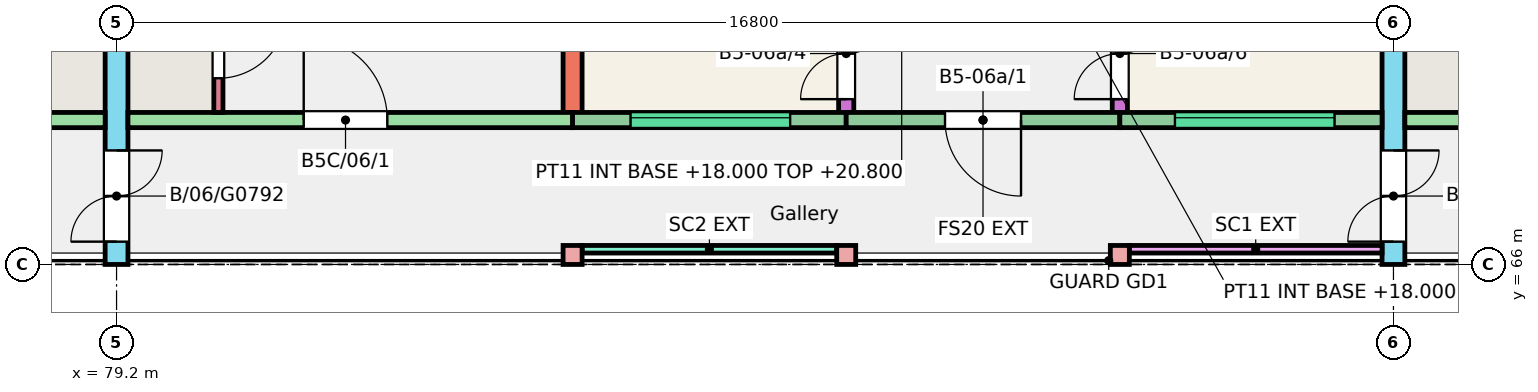
"""IFC4 building model, lengths in metres.
Left out: names, types, materials, properties, quantities, classifications, styles, units other than length and angle.
Written with IfcOpenShell. Run it as: python <this file> out.ifc"""

import sys

from ifc_helpers import new_model, si_unit, direction, frame, frame_2d, origin, origin_2d, place, context, subcontext, project, spatial, rectangle, extrude, element, fill, save


model = new_model("IFC4")
c1 = context("Model", 3, precision=1e-05, world=origin(), true_north=direction((0.0, 1.0)))
c2 = subcontext(c1, "Body", "Model", "MODEL_VIEW")
j1 = project(units=[si_unit("LENGTHUNIT", "METRE"), si_unit("PLANEANGLEUNIT", "RADIAN")], contexts=[c1])
p1 = place(None, origin())
s1 = spatial("IfcSite", under=j1, at=p1, CompositionType="ELEMENT")
p2 = place(p1, origin())
s2 = spatial("IfcBuilding", under=s1, at=p2, CompositionType="ELEMENT")
p3 = place(p2, frame((0.0, 0.0, 18.0)))
s3 = spatial("IfcBuildingStorey", under=s2, at=p3, CompositionType="ELEMENT", Elevation=18.0)
p4 = place(p3, frame((79.2, 66.0, 0.0), z_axis=(0.0, 0.0, 1.0), x_axis=(0.0, 1.0, 0.0)))
e1 = element("IfcWall", 1, at=p4, inside=s3, PredefinedType="SHEAR", context=c2, shape_type="SweptSolid", body=[
    extrude(rectangle(XDim=11.0, YDim=0.3, at=frame_2d((5.5, 0.0))), origin(), (0.0, 0.0, 1.0), 3.0),
])
p5 = place(p4, frame((0.3, 0.0, 0.0)))
e2 = element("IfcOpeningElement", 2, at=p5, cuts=e1, PredefinedType="OPENING", context=c2, shape_type="SweptSolid", body=[
    extrude(rectangle(XDim=1.2, YDim=2.1, at=frame_2d((0.6, 1.05))), frame((0.0, 0.16, 0.0), z_axis=(0.0, -1.0, 0.0), x_axis=(1.0, 0.0, 0.0)), (0.0, 0.0, 1.0), 0.32),
])
p6 = place(p3, frame((85.2, 68.0, 0.0), z_axis=(0.0, 0.0, 1.0), x_axis=(0.0, 1.0, 0.0)))
e3 = element("IfcWall", 3, at=p6, inside=s3, PredefinedType="SHEAR", context=c2, shape_type="SweptSolid", body=[
    extrude(rectangle(XDim=9.0, YDim=0.25, at=frame_2d((4.5, 0.0))), origin(), (0.0, 0.0, 1.0), 3.0),
])
p7 = place(p3, frame((88.8, 68.0, 0.0), z_axis=(0.0, 0.0, 1.0), x_axis=(0.0, 1.0, 0.0)))
e4 = element("IfcWall", 4, at=p7, inside=s3, PredefinedType="SHEAR", context=c2, shape_type="SweptSolid", body=[
    extrude(rectangle(XDim=9.0, YDim=0.2, at=frame_2d((4.5, 0.0))), origin(), (0.0, 0.0, 1.0), 3.0),
])
p8 = place(p7, frame((0.175, 0.0, 0.0)))
e5 = element("IfcOpeningElement", 5, at=p8, cuts=e4, PredefinedType="OPENING", context=c2, shape_type="SweptSolid", body=[
    extrude(rectangle(XDim=1.2, YDim=2.1, at=frame_2d((0.6, 1.05))), frame((0.0, 0.11, 0.0), z_axis=(0.0, -1.0, 0.0), x_axis=(1.0, 0.0, 0.0)), (0.0, 0.0, 1.0), 0.22),
])
p9 = place(p7, frame((6.4, 0.0, 0.0)))
e6 = element("IfcOpeningElement", 6, at=p9, cuts=e4, PredefinedType="OPENING", context=c2, shape_type="SweptSolid", body=[
    extrude(rectangle(XDim=1.2, YDim=2.1, at=frame_2d((0.6, 1.05))), frame((0.0, 0.11, 0.0), z_axis=(0.0, -1.0, 0.0), x_axis=(1.0, 0.0, 0.0)), (0.0, 0.0, 1.0), 0.22),
])
p10 = place(p3, frame((92.4, 68.0, 0.0), z_axis=(0.0, 0.0, 1.0), x_axis=(0.0, 1.0, 0.0)))
e7 = element("IfcWall", 7, at=p10, inside=s3, PredefinedType="SHEAR", context=c2, shape_type="SweptSolid", body=[
    extrude(rectangle(XDim=9.0, YDim=0.2, at=frame_2d((4.5, 0.0))), origin(), (0.0, 0.0, 1.0), 3.0),
])
p11 = place(p10, frame((0.175, 0.0, 0.0)))
e8 = element("IfcOpeningElement", 8, at=p11, cuts=e7, PredefinedType="OPENING", context=c2, shape_type="SweptSolid", body=[
    extrude(rectangle(XDim=1.2, YDim=2.1, at=frame_2d((0.6, 1.05))), frame((0.0, 0.11, 0.0), z_axis=(0.0, -1.0, 0.0), x_axis=(1.0, 0.0, 0.0)), (0.0, 0.0, 1.0), 0.22),
])
p12 = place(p10, frame((6.4, 0.0, 0.0)))
e9 = element("IfcOpeningElement", 9, at=p12, cuts=e7, PredefinedType="OPENING", context=c2, shape_type="SweptSolid", body=[
    extrude(rectangle(XDim=1.2, YDim=2.1, at=frame_2d((0.6, 1.05))), frame((0.0, 0.11, 0.0), z_axis=(0.0, -1.0, 0.0), x_axis=(1.0, 0.0, 0.0)), (0.0, 0.0, 1.0), 0.22),
])
p13 = place(p3, frame((96.0, 66.0, 0.0), z_axis=(0.0, 0.0, 1.0), x_axis=(0.0, 1.0, 0.0)))
e10 = element("IfcWall", 10, at=p13, inside=s3, PredefinedType="SHEAR", context=c2, shape_type="SweptSolid", body=[
    extrude(rectangle(XDim=11.0, YDim=0.3, at=frame_2d((5.5, 0.0))), origin(), (0.0, 0.0, 1.0), 3.0),
])
p14 = place(p13, frame((0.3, 0.0, 0.0)))
e11 = element("IfcOpeningElement", 11, at=p14, cuts=e10, PredefinedType="OPENING", context=c2, shape_type="SweptSolid", body=[
    extrude(rectangle(XDim=1.2, YDim=2.1, at=frame_2d((0.6, 1.05))), frame((0.0, 0.16, 0.0), z_axis=(0.0, -1.0, 0.0), x_axis=(1.0, 0.0, 0.0)), (0.0, 0.0, 1.0), 0.32),
])
p15 = place(p3, frame((73.2, 67.9, 0.0), z_axis=(0.0, 0.0, 1.0), x_axis=(1.0, 0.0, 0.0)))
e12 = element("IfcWall", 12, at=p15, inside=s3, PredefinedType="SHEAR", context=c2, shape_type="SweptSolid", body=[
    extrude(rectangle(XDim=5.85, YDim=0.2, at=frame_2d((2.925, 0.0))), origin(), (0.0, 0.0, 1.0), 3.0),
])
p16 = place(p15, frame((2.438, 0.0, 0.0)))
e13 = element("IfcOpeningElement", 13, at=p16, cuts=e12, PredefinedType="OPENING", context=c2, shape_type="SweptSolid", body=[
    extrude(rectangle(XDim=1.1, YDim=2.1, at=frame_2d((0.55, 1.05))), frame((0.0, 0.11, 0.0), z_axis=(0.0, -1.0, 0.0), x_axis=(1.0, 0.0, 0.0)), (0.0, 0.0, 1.0), 0.22),
])
p17 = place(p3, frame((79.35, 67.9, 0.0), z_axis=(0.0, 0.0, 1.0), x_axis=(1.0, 0.0, 0.0)))
e14 = element("IfcWall", 14, at=p17, inside=s3, PredefinedType="SHEAR", context=c2, shape_type="SweptSolid", body=[
    extrude(rectangle(XDim=5.85, YDim=0.2, at=frame_2d((2.925, 0.0))), origin(), (0.0, 0.0, 1.0), 3.0),
])
p18 = place(p17, frame((2.312, 0.0, 0.0)))
e15 = element("IfcOpeningElement", 15, at=p18, cuts=e14, PredefinedType="OPENING", context=c2, shape_type="SweptSolid", body=[
    extrude(rectangle(XDim=1.1, YDim=2.1, at=frame_2d((0.55, 1.05))), frame((0.0, 0.11, 0.0), z_axis=(0.0, -1.0, 0.0), x_axis=(1.0, 0.0, 0.0)), (0.0, 0.0, 1.0), 0.22),
])
p19 = place(p3, frame((80.54, 68.0, 0.0), z_axis=(0.0, 0.0, 1.0), x_axis=(0.0, 1.0, 0.0)))
e16 = element("IfcWall", 16, at=p19, inside=s3, PredefinedType="SHEAR", context=c2, shape_type="SweptSolid", body=[
    extrude(rectangle(XDim=1.72, YDim=0.12, at=frame_2d((0.86, 0.0))), origin(), (0.0, 0.0, 1.0), 3.0),
])
p20 = place(p19, frame((0.45, 0.0, 0.0)))
e17 = element("IfcOpeningElement", 17, at=p20, cuts=e16, PredefinedType="OPENING", context=c2, shape_type="SweptSolid", body=[
    extrude(rectangle(XDim=0.9, YDim=2.1, at=frame_2d((0.45, 1.05))), frame((0.0, 0.07, 0.0), z_axis=(0.0, -1.0, 0.0), x_axis=(1.0, 0.0, 0.0)), (0.0, 0.0, 1.0), 0.14),
])
p21 = place(p3, frame((85.2, 67.9, 0.0), z_axis=(0.0, 0.0, 1.0), x_axis=(1.0, 0.0, 0.0)))
e18 = element("IfcWall", 18, at=p21, inside=s3, PredefinedType="SOLIDWALL", context=c2, shape_type="SweptSolid", body=[
    extrude(rectangle(XDim=3.6, YDim=0.2, at=frame_2d((1.8, 0.0))), origin(), (0.0, 0.0, 1.0), 3.0),
])
p22 = place(p21, frame((0.762, 0.0, 1.2)))
e19 = element("IfcOpeningElement", 19, at=p22, cuts=e18, PredefinedType="OPENING", context=c2, shape_type="SweptSolid", body=[
    extrude(rectangle(XDim=2.1, YDim=1.2, at=frame_2d((1.05, 0.6))), frame((0.0, 0.11, 0.0), z_axis=(0.0, -1.0, 0.0), x_axis=(1.0, 0.0, 0.0)), (0.0, 0.0, 1.0), 0.22),
])
p23 = place(p3, frame((88.8, 67.9, 0.0), z_axis=(0.0, 0.0, 1.0), x_axis=(1.0, 0.0, 0.0)))
e20 = element("IfcWall", 20, at=p23, inside=s3, PredefinedType="SOLIDWALL", context=c2, shape_type="SweptSolid", body=[
    extrude(rectangle(XDim=3.6, YDim=0.2, at=frame_2d((1.8, 0.0))), origin(), (0.0, 0.0, 1.0), 3.0),
])
p24 = place(p23, frame((1.3, 0.0, 0.0)))
e21 = element("IfcOpeningElement", 21, at=p24, cuts=e20, PredefinedType="OPENING", context=c2, shape_type="SweptSolid", body=[
    extrude(rectangle(XDim=1.0, YDim=2.1, at=frame_2d((0.5, 1.05))), frame((0.0, 0.11, 0.0), z_axis=(0.0, -1.0, 0.0), x_axis=(1.0, 0.0, 0.0)), (0.0, 0.0, 1.0), 0.22),
])
p25 = place(p3, frame((92.4, 67.9, 0.0), z_axis=(0.0, 0.0, 1.0), x_axis=(1.0, 0.0, 0.0)))
e22 = element("IfcWall", 22, at=p25, inside=s3, PredefinedType="SOLIDWALL", context=c2, shape_type="SweptSolid", body=[
    extrude(rectangle(XDim=3.45, YDim=0.2, at=frame_2d((1.725, 0.0))), origin(), (0.0, 0.0, 1.0), 3.0),
])
p26 = place(p25, frame((0.725, 0.0, 1.2)))
e23 = element("IfcOpeningElement", 23, at=p26, cuts=e22, PredefinedType="OPENING", context=c2, shape_type="SweptSolid", body=[
    extrude(rectangle(XDim=2.1, YDim=1.2, at=frame_2d((1.05, 0.6))), frame((0.0, 0.11, 0.0), z_axis=(0.0, -1.0, 0.0), x_axis=(1.0, 0.0, 0.0)), (0.0, 0.0, 1.0), 0.22),
])
p27 = place(p3, frame((96.15, 67.9, 0.0), z_axis=(0.0, 0.0, 1.0), x_axis=(1.0, 0.0, 0.0)))
e24 = element("IfcWall", 24, at=p27, inside=s3, PredefinedType="SHEAR", context=c2, shape_type="SweptSolid", body=[
    extrude(rectangle(XDim=5.85, YDim=0.2, at=frame_2d((2.925, 0.0))), origin(), (0.0, 0.0, 1.0), 3.0),
])
p28 = place(p27, frame((2.312, 0.0, 0.0)))
e25 = element("IfcOpeningElement", 25, at=p28, cuts=e24, PredefinedType="OPENING", context=c2, shape_type="SweptSolid", body=[
    extrude(rectangle(XDim=1.1, YDim=2.1, at=frame_2d((0.55, 1.05))), frame((0.0, 0.11, 0.0), z_axis=(0.0, -1.0, 0.0), x_axis=(1.0, 0.0, 0.0)), (0.0, 0.0, 1.0), 0.22),
])
for number, where, z_axis, x_axis in (
    (26, (85.2, 66.125, 0.0), (0.0, 0.0, 1.0), (1.0, 0.0, 0.0)),
    (27, (88.8, 66.125, 0.0), (0.0, 0.0, 1.0), (1.0, 0.0, 0.0)),
    (28, (92.4, 66.125, 0.0), (0.0, 0.0, 1.0), (1.0, 0.0, 0.0)),
):
    element("IfcColumn", number, at=place(p3, frame(where, z_axis=z_axis, x_axis=x_axis)), inside=s3, PredefinedType="COLUMN", context=c2, shape_type="SweptSolid", body=[
        extrude(rectangle(XDim=0.25, YDim=0.25, at=origin_2d()), origin(), (0.0, 0.0, 1.0), 3.0),
    ])
p29 = place(p3, frame((85.325, 66.2, 0.0), z_axis=(0.0, 0.0, 1.0), x_axis=(1.0, 0.0, 0.0)))
e29 = element("IfcWall", 29, at=p29, inside=s3, PredefinedType="SOLIDWALL", context=c2, shape_type="SweptSolid", body=[
    extrude(rectangle(XDim=3.35, YDim=0.1, at=frame_2d((1.675, 0.0))), origin(), (0.0, 0.0, 1.0), 2.45),
])
p30 = place(p3, frame((92.525, 66.2, 0.0), z_axis=(0.0, 0.0, 1.0), x_axis=(1.0, 0.0, 0.0)))
e30 = element("IfcWall", 30, at=p30, inside=s3, PredefinedType="SOLIDWALL", context=c2, shape_type="SweptSolid", body=[
    extrude(rectangle(XDim=3.325, YDim=0.1, at=frame_2d((1.663, 0.0))), origin(), (0.0, 0.0, 1.0), 2.45),
])
p31 = place(p22, origin())
e31 = element("IfcWindow", 31, at=p31, inside=s3, PartitioningType="SINGLE_PANEL", PredefinedType="WINDOW", context=c2, shape_type="SweptSolid", body=[
    extrude(rectangle(XDim=2.1, YDim=1.2, at=frame_2d((1.05, 0.6))), frame((0.0, 0.06, 0.0), z_axis=(0.0, -1.0, 0.0), x_axis=(1.0, 0.0, 0.0)), (0.0, 0.0, 1.0), 0.06),
])
fill(e19, e31)
p32 = place(p26, origin())
e32 = element("IfcWindow", 32, at=p32, inside=s3, PartitioningType="SINGLE_PANEL", PredefinedType="WINDOW", context=c2, shape_type="SweptSolid", body=[
    extrude(rectangle(XDim=2.1, YDim=1.2, at=frame_2d((1.05, 0.6))), frame((0.0, 0.06, 0.0), z_axis=(0.0, -1.0, 0.0), x_axis=(1.0, 0.0, 0.0)), (0.0, 0.0, 1.0), 0.06),
])
fill(e23, e32)
p33 = place(p24, origin())
e33 = element("IfcDoor", 33, at=p33, inside=s3, OperationType="SINGLE_SWING_RIGHT", PredefinedType="DOOR", context=c2, shape_type="SweptSolid", body=[
    extrude(rectangle(XDim=1.0, YDim=2.1, at=frame_2d((0.5, 1.05))), frame((0.0, 0.025, 0.0), z_axis=(0.0, -1.0, 0.0), x_axis=(1.0, 0.0, 0.0)), (0.0, 0.0, 1.0), 0.05),
])
fill(e21, e33)
p34 = place(p8, origin())
e34 = element("IfcDoor", 34, at=p34, inside=s3, OperationType="DOUBLE_DOOR_SINGLE_SWING", PredefinedType="DOOR", context=c2, shape_type="SweptSolid", body=[
    extrude(rectangle(XDim=1.2, YDim=2.1, at=frame_2d((0.6, 1.05))), frame((0.0, 0.025, 0.0), z_axis=(0.0, -1.0, 0.0), x_axis=(1.0, 0.0, 0.0)), (0.0, 0.0, 1.0), 0.05),
])
fill(e5, e34)
p35 = place(p11, origin())
e35 = element("IfcDoor", 35, at=p35, inside=s3, OperationType="DOUBLE_DOOR_SINGLE_SWING", PredefinedType="DOOR", context=c2, shape_type="SweptSolid", body=[
    extrude(rectangle(XDim=1.2, YDim=2.1, at=frame_2d((0.6, 1.05))), frame((0.0, 0.025, 0.0), z_axis=(0.0, -1.0, 0.0), x_axis=(1.0, 0.0, 0.0)), (0.0, 0.0, 1.0), 0.05),
])
fill(e8, e35)
p36 = place(p18, origin())
e36 = element("IfcDoor", 36, at=p36, inside=s3, OperationType="SINGLE_SWING_LEFT", PredefinedType="DOOR", context=c2, shape_type="SweptSolid", body=[
    extrude(rectangle(XDim=1.1, YDim=2.1, at=frame_2d((0.55, 1.05))), frame((0.0, 0.025, 0.0), z_axis=(0.0, -1.0, 0.0), x_axis=(1.0, 0.0, 0.0)), (0.0, 0.0, 1.0), 0.05),
])
fill(e15, e36)
p37 = place(p20, origin())
e37 = element("IfcDoor", 37, at=p37, inside=s3, OperationType="SINGLE_SWING_RIGHT", PredefinedType="DOOR", context=c2, shape_type="SweptSolid", body=[
    extrude(rectangle(XDim=0.9, YDim=2.1, at=frame_2d((0.45, 1.05))), frame((0.0, 0.025, 0.0), z_axis=(0.0, -1.0, 0.0), x_axis=(1.0, 0.0, 0.0)), (0.0, 0.0, 1.0), 0.05),
])
fill(e17, e37)
p38 = place(p5, origin())
e38 = element("IfcDoor", 38, at=p38, inside=s3, OperationType="DOUBLE_DOOR_SINGLE_SWING", PredefinedType="DOOR", context=c2, shape_type="SweptSolid", body=[
    extrude(rectangle(XDim=1.2, YDim=2.1, at=frame_2d((0.6, 1.05))), frame((0.0, 0.025, 0.0), z_axis=(0.0, -1.0, 0.0), x_axis=(1.0, 0.0, 0.0)), (0.0, 0.0, 1.0), 0.05),
])
fill(e2, e38)
p39 = place(p14, origin())
e39 = element("IfcDoor", 39, at=p39, inside=s3, OperationType="DOUBLE_DOOR_SINGLE_SWING", PredefinedType="DOOR", context=c2, shape_type="SweptSolid", body=[
    extrude(rectangle(XDim=1.2, YDim=2.1, at=frame_2d((0.6, 1.05))), frame((0.0, 0.025, 0.0), z_axis=(0.0, -1.0, 0.0), x_axis=(1.0, 0.0, 0.0)), (0.0, 0.0, 1.0), 0.05),
])
fill(e11, e39)
save(model, sys.argv[1])
